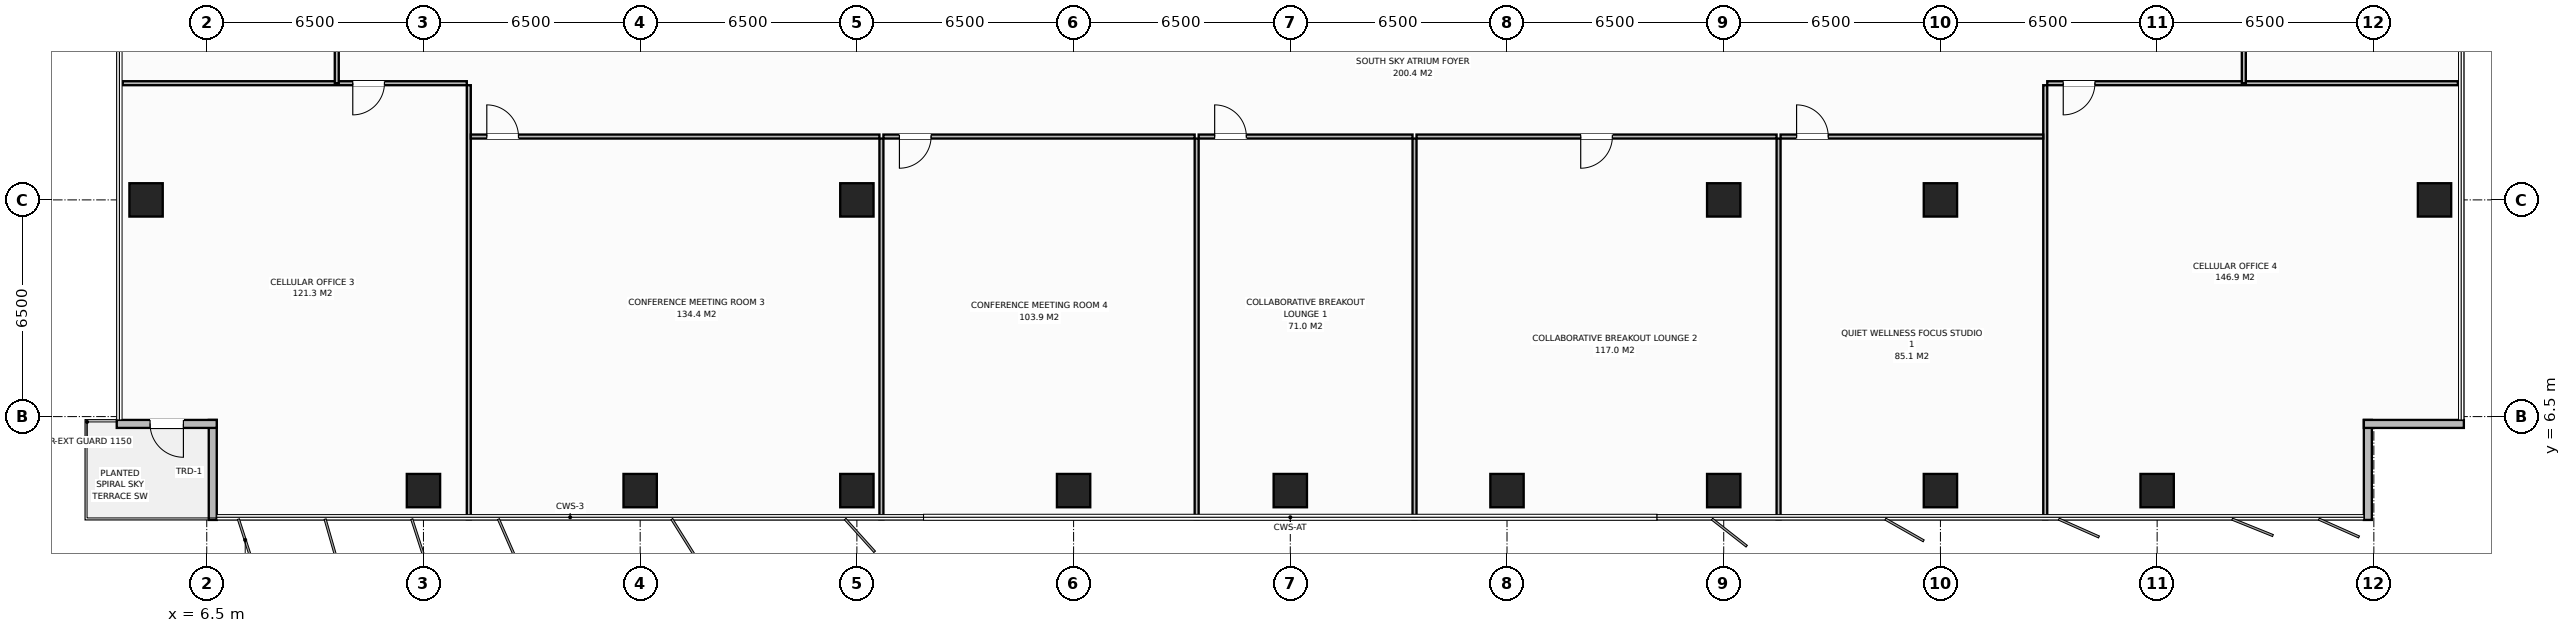
"""IFC4 building model, lengths in metres.
Left out: names, types, materials, properties, quantities, classifications, styles, units other than length and angle.
Written with IfcOpenShell. Run it as: python <this file> out.ifc"""

import sys

from ifc_helpers import new_model, si_unit, direction, frame, frame_2d, origin, origin_2d, place, context, subcontext, project, spatial, rectangle, extrude, element, fill, save


model = new_model("IFC4")
c1 = context("Model", 3, precision=1e-05, world=origin(), true_north=direction((0.0, 1.0)))
c2 = subcontext(c1, "Body", "Model", "MODEL_VIEW")
j1 = project(units=[si_unit("LENGTHUNIT", "METRE"), si_unit("PLANEANGLEUNIT", "RADIAN")], contexts=[c1])
p1 = place(None, origin())
s1 = spatial("IfcSite", under=j1, at=p1, CompositionType="ELEMENT")
p2 = place(p1, origin())
s2 = spatial("IfcBuilding", under=s1, at=p2, CompositionType="ELEMENT")
p3 = place(p2, frame((0.0, 0.0, 167.0)))
s3 = spatial("IfcBuildingStorey", under=s2, at=p3, CompositionType="ELEMENT", Elevation=167.0)
for number, where, z_axis, x_axis in (
    (1, (58.5, 13.0, 0.0), (0.0, 0.0, 1.0), (1.0, 0.0, 0.0)),
    (2, (26.0, 13.0, 0.0), (0.0, 0.0, 1.0), (1.0, 0.0, 0.0)),
    (3, (52.0, 13.0, 0.0), (0.0, 0.0, 1.0), (1.0, 0.0, 0.0)),
    (4, (13.0, 4.28, 0.0), (0.0, 0.0, 1.0), (1.0, 0.0, 0.0)),
    (5, (19.5, 4.28, 0.0), (0.0, 0.0, 1.0), (1.0, 0.0, 0.0)),
    (6, (26.0, 4.28, 0.0), (0.0, 0.0, 1.0), (1.0, 0.0, 0.0)),
    (7, (32.5, 4.28, 0.0), (0.0, 0.0, 1.0), (1.0, 0.0, 0.0)),
    (8, (39.0, 4.28, 0.0), (0.0, 0.0, 1.0), (1.0, 0.0, 0.0)),
    (9, (45.5, 4.28, 0.0), (0.0, 0.0, 1.0), (1.0, 0.0, 0.0)),
    (10, (52.0, 4.28, 0.0), (0.0, 0.0, 1.0), (1.0, 0.0, 0.0)),
    (11, (58.5, 4.28, 0.0), (0.0, 0.0, 1.0), (1.0, 0.0, 0.0)),
    (12, (65.0, 4.28, 0.0), (0.0, 0.0, 1.0), (1.0, 0.0, 0.0)),
    (13, (4.68, 13.0, 0.0), (0.0, 0.0, 1.0), (1.0, 0.0, 0.0)),
    (14, (73.32, 13.0, 0.0), (0.0, 0.0, 1.0), (1.0, 0.0, 0.0)),
):
    element("IfcColumn", number, at=place(p3, frame(where, z_axis=z_axis, x_axis=x_axis)), inside=s3, PredefinedType="COLUMN", context=c2, shape_type="SweptSolid", body=[
        extrude(rectangle(XDim=1.0, YDim=1.0, at=origin_2d()), origin(), (0.0, 0.0, 1.0), 3.8),
    ])
p4 = place(p3, frame((6.68, 3.4, 0.0), z_axis=(0.0, 0.0, 1.0), x_axis=(0.0, 1.0, 0.0)))
e15 = element("IfcWall", 15, at=p4, inside=s3, PredefinedType="STANDARD", context=c2, shape_type="SweptSolid", body=[
    extrude(rectangle(XDim=3.0, YDim=0.24, at=frame_2d((1.5, 0.0))), origin(), (0.0, 0.0, 1.0), 3.572),
])
p5 = place(p3, frame((6.8, 6.28, 0.0), z_axis=(0.0, 0.0, 1.0), x_axis=(-1.0, 0.0, 0.0)))
e16 = element("IfcWall", 16, at=p5, inside=s3, PredefinedType="STANDARD", context=c2, shape_type="SweptSolid", body=[
    extrude(rectangle(XDim=3.0, YDim=0.24, at=frame_2d((1.5, 0.0))), origin(), (0.0, 0.0, 1.0), 3.572),
])
p6 = place(p5, frame((1.0, 0.0, 0.0)))
e17 = element("IfcOpeningElement", 17, at=p6, cuts=e16, PredefinedType="OPENING", context=c2, shape_type="SweptSolid", body=[
    extrude(rectangle(XDim=1.0, YDim=2.2, at=frame_2d((0.5, 1.1))), frame((0.0, 0.13, 0.0), z_axis=(0.0, -1.0, 0.0), x_axis=(1.0, 0.0, 0.0)), (0.0, 0.0, 1.0), 0.26),
])
for number, where, z_axis, x_axis in (
    (18, (71.32, 6.4, 0.0), (0.0, 0.0, 1.0), (0.0, -1.0, 0.0)),
    (19, (74.2, 6.28, 0.0), (0.0, 0.0, 1.0), (-1.0, 0.0, 0.0)),
):
    element("IfcWall", number, at=place(p3, frame(where, z_axis=z_axis, x_axis=x_axis)), inside=s3, PredefinedType="STANDARD", context=c2, shape_type="SweptSolid", body=[
        extrude(rectangle(XDim=3.0, YDim=0.24, at=frame_2d((1.5, 0.0))), origin(), (0.0, 0.0, 1.0), 3.572),
    ])
p7 = place(p3, frame((14.36, 3.42, 0.0), z_axis=(0.0, 0.0, 1.0), x_axis=(0.0, 1.0, 0.0)))
e20 = element("IfcWall", 20, at=p7, inside=s3, PredefinedType="PARTITIONING", context=c2, shape_type="SweptSolid", body=[
    extrude(rectangle(XDim=13.02, YDim=0.12, at=frame_2d((6.51, 0.0))), origin(), (0.0, 0.0, 1.0), 3.572),
])
p8 = place(p3, frame((3.98, 16.5, 0.0), z_axis=(0.0, 0.0, 1.0), x_axis=(1.0, 0.0, 0.0)))
e21 = element("IfcWall", 21, at=p8, inside=s3, PredefinedType="PARTITIONING", context=c2, shape_type="SweptSolid", body=[
    extrude(rectangle(XDim=10.32, YDim=0.12, at=frame_2d((5.16, 0.0))), origin(), (0.0, 0.0, 1.0), 3.572),
])
p9 = place(p8, frame((6.9, 0.0, 0.0)))
e22 = element("IfcOpeningElement", 22, at=p9, cuts=e21, PredefinedType="OPENING", context=c2, shape_type="SweptSolid", body=[
    extrude(rectangle(XDim=0.95, YDim=2.15, at=frame_2d((0.475, 1.075))), frame((0.0, 0.07, 0.0), z_axis=(0.0, -1.0, 0.0), x_axis=(1.0, 0.0, 0.0)), (0.0, 0.0, 1.0), 0.14),
])
p10 = place(p3, frame((26.736, 3.42, 0.0), z_axis=(0.0, 0.0, 1.0), x_axis=(0.0, 1.0, 0.0)))
e23 = element("IfcWall", 23, at=p10, inside=s3, PredefinedType="PARTITIONING", context=c2, shape_type="SweptSolid", body=[
    extrude(rectangle(XDim=11.42, YDim=0.12, at=frame_2d((5.71, 0.0))), origin(), (0.0, 0.0, 1.0), 3.572),
])
p11 = place(p3, frame((14.42, 14.9, 0.0), z_axis=(0.0, 0.0, 1.0), x_axis=(1.0, 0.0, 0.0)))
e24 = element("IfcWall", 24, at=p11, inside=s3, PredefinedType="PARTITIONING", context=c2, shape_type="SweptSolid", body=[
    extrude(rectangle(XDim=12.256, YDim=0.12, at=frame_2d((6.128, 0.0))), origin(), (0.0, 0.0, 1.0), 3.572),
])
p12 = place(p11, frame((0.48, 0.0, 0.0)))
e25 = element("IfcOpeningElement", 25, at=p12, cuts=e24, PredefinedType="OPENING", context=c2, shape_type="SweptSolid", body=[
    extrude(rectangle(XDim=0.95, YDim=2.15, at=frame_2d((0.475, 1.075))), frame((0.0, 0.07, 0.0), z_axis=(0.0, -1.0, 0.0), x_axis=(1.0, 0.0, 0.0)), (0.0, 0.0, 1.0), 0.14),
])
p13 = place(p3, frame((36.191, 3.42, 0.0), z_axis=(0.0, 0.0, 1.0), x_axis=(0.0, 1.0, 0.0)))
e26 = element("IfcWall", 26, at=p13, inside=s3, PredefinedType="PARTITIONING", context=c2, shape_type="SweptSolid", body=[
    extrude(rectangle(XDim=11.42, YDim=0.12, at=frame_2d((5.71, 0.0))), origin(), (0.0, 0.0, 1.0), 3.572),
])
p14 = place(p3, frame((26.796, 14.9, 0.0), z_axis=(0.0, 0.0, 1.0), x_axis=(1.0, 0.0, 0.0)))
e27 = element("IfcWall", 27, at=p14, inside=s3, PredefinedType="PARTITIONING", context=c2, shape_type="SweptSolid", body=[
    extrude(rectangle(XDim=9.335, YDim=0.12, at=frame_2d((4.668, 0.0))), origin(), (0.0, 0.0, 1.0), 3.572),
])
p15 = place(p14, frame((0.48, 0.0, 0.0)))
e28 = element("IfcOpeningElement", 28, at=p15, cuts=e27, PredefinedType="OPENING", context=c2, shape_type="SweptSolid", body=[
    extrude(rectangle(XDim=0.95, YDim=2.15, at=frame_2d((0.475, 1.075))), frame((0.0, 0.07, 0.0), z_axis=(0.0, -1.0, 0.0), x_axis=(1.0, 0.0, 0.0)), (0.0, 0.0, 1.0), 0.14),
])
p16 = place(p3, frame((42.726, 3.42, 0.0), z_axis=(0.0, 0.0, 1.0), x_axis=(0.0, 1.0, 0.0)))
e29 = element("IfcWall", 29, at=p16, inside=s3, PredefinedType="PARTITIONING", context=c2, shape_type="SweptSolid", body=[
    extrude(rectangle(XDim=11.42, YDim=0.12, at=frame_2d((5.71, 0.0))), origin(), (0.0, 0.0, 1.0), 3.572),
])
p17 = place(p3, frame((36.251, 14.9, 0.0), z_axis=(0.0, 0.0, 1.0), x_axis=(1.0, 0.0, 0.0)))
e30 = element("IfcWall", 30, at=p17, inside=s3, PredefinedType="PARTITIONING", context=c2, shape_type="SweptSolid", body=[
    extrude(rectangle(XDim=6.415, YDim=0.12, at=frame_2d((3.207, 0.0))), origin(), (0.0, 0.0, 1.0), 3.572),
])
p18 = place(p17, frame((0.48, 0.0, 0.0)))
e31 = element("IfcOpeningElement", 31, at=p18, cuts=e30, PredefinedType="OPENING", context=c2, shape_type="SweptSolid", body=[
    extrude(rectangle(XDim=0.95, YDim=2.15, at=frame_2d((0.475, 1.075))), frame((0.0, 0.07, 0.0), z_axis=(0.0, -1.0, 0.0), x_axis=(1.0, 0.0, 0.0)), (0.0, 0.0, 1.0), 0.14),
])
p19 = place(p3, frame((53.646, 3.42, 0.0), z_axis=(0.0, 0.0, 1.0), x_axis=(0.0, 1.0, 0.0)))
e32 = element("IfcWall", 32, at=p19, inside=s3, PredefinedType="PARTITIONING", context=c2, shape_type="SweptSolid", body=[
    extrude(rectangle(XDim=11.42, YDim=0.12, at=frame_2d((5.71, 0.0))), origin(), (0.0, 0.0, 1.0), 3.572),
])
p20 = place(p3, frame((42.786, 14.9, 0.0), z_axis=(0.0, 0.0, 1.0), x_axis=(1.0, 0.0, 0.0)))
e33 = element("IfcWall", 33, at=p20, inside=s3, PredefinedType="PARTITIONING", context=c2, shape_type="SweptSolid", body=[
    extrude(rectangle(XDim=10.799, YDim=0.12, at=frame_2d((5.4, 0.0))), origin(), (0.0, 0.0, 1.0), 3.572),
])
p21 = place(p20, frame((4.925, 0.0, 0.0)))
e34 = element("IfcOpeningElement", 34, at=p21, cuts=e33, PredefinedType="OPENING", context=c2, shape_type="SweptSolid", body=[
    extrude(rectangle(XDim=0.95, YDim=2.15, at=frame_2d((0.475, 1.075))), frame((0.0, 0.07, 0.0), z_axis=(0.0, -1.0, 0.0), x_axis=(1.0, 0.0, 0.0)), (0.0, 0.0, 1.0), 0.14),
])
p22 = place(p3, frame((61.644, 3.42, 0.0), z_axis=(0.0, 0.0, 1.0), x_axis=(0.0, 1.0, 0.0)))
e35 = element("IfcWall", 35, at=p22, inside=s3, PredefinedType="PARTITIONING", context=c2, shape_type="SweptSolid", body=[
    extrude(rectangle(XDim=13.02, YDim=0.12, at=frame_2d((6.51, 0.0))), origin(), (0.0, 0.0, 1.0), 3.572),
])
p23 = place(p3, frame((53.705, 14.9, 0.0), z_axis=(0.0, 0.0, 1.0), x_axis=(1.0, 0.0, 0.0)))
e36 = element("IfcWall", 36, at=p23, inside=s3, PredefinedType="PARTITIONING", context=c2, shape_type="SweptSolid", body=[
    extrude(rectangle(XDim=7.879, YDim=0.12, at=frame_2d((3.939, 0.0))), origin(), (0.0, 0.0, 1.0), 3.572),
])
p24 = place(p23, frame((0.48, 0.0, 0.0)))
e37 = element("IfcOpeningElement", 37, at=p24, cuts=e36, PredefinedType="OPENING", context=c2, shape_type="SweptSolid", body=[
    extrude(rectangle(XDim=0.95, YDim=2.15, at=frame_2d((0.475, 1.075))), frame((0.0, 0.07, 0.0), z_axis=(0.0, -1.0, 0.0), x_axis=(1.0, 0.0, 0.0)), (0.0, 0.0, 1.0), 0.14),
])
p25 = place(p3, frame((61.704, 16.5, 0.0), z_axis=(0.0, 0.0, 1.0), x_axis=(1.0, 0.0, 0.0)))
e38 = element("IfcWall", 38, at=p25, inside=s3, PredefinedType="PARTITIONING", context=c2, shape_type="SweptSolid", body=[
    extrude(rectangle(XDim=12.316, YDim=0.12, at=frame_2d((6.158, 0.0))), origin(), (0.0, 0.0, 1.0), 3.572),
])
p26 = place(p25, frame((0.48, 0.0, 0.0)))
e39 = element("IfcOpeningElement", 39, at=p26, cuts=e38, PredefinedType="OPENING", context=c2, shape_type="SweptSolid", body=[
    extrude(rectangle(XDim=0.95, YDim=2.15, at=frame_2d((0.475, 1.075))), frame((0.0, 0.07, 0.0), z_axis=(0.0, -1.0, 0.0), x_axis=(1.0, 0.0, 0.0)), (0.0, 0.0, 1.0), 0.14),
])
p27 = place(p3, frame((10.4, 16.5, 0.0), z_axis=(0.0, 0.0, 1.0), x_axis=(0.0, 1.0, 0.0)))
e40 = element("IfcWall", 40, at=p27, inside=s3, PredefinedType="PARTITIONING", context=c2, shape_type="SweptSolid", body=[
    extrude(rectangle(XDim=19.0, YDim=0.12, at=frame_2d((9.5, 0.0))), origin(), (0.0, 0.0, 1.0), 3.572),
])
p28 = place(p27, frame((9.025, 0.0, 0.0)))
e41 = element("IfcOpeningElement", 41, at=p28, cuts=e40, PredefinedType="OPENING", context=c2, shape_type="SweptSolid", body=[
    extrude(rectangle(XDim=0.95, YDim=2.15, at=frame_2d((0.475, 1.075))), frame((0.0, 0.07, 0.0), z_axis=(0.0, -1.0, 0.0), x_axis=(1.0, 0.0, 0.0)), (0.0, 0.0, 1.0), 0.14),
])
p29 = place(p3, frame((67.6, 16.5, 0.0), z_axis=(0.0, 0.0, 1.0), x_axis=(0.0, 1.0, 0.0)))
e42 = element("IfcWall", 42, at=p29, inside=s3, PredefinedType="PARTITIONING", context=c2, shape_type="SweptSolid", body=[
    extrude(rectangle(XDim=9.5, YDim=0.12, at=frame_2d((4.75, 0.0))), origin(), (0.0, 0.0, 1.0), 3.572),
])
p30 = place(p29, frame((5.325, 0.0, 0.0)))
e43 = element("IfcOpeningElement", 43, at=p30, cuts=e42, PredefinedType="OPENING", context=c2, shape_type="SweptSolid", body=[
    extrude(rectangle(XDim=0.95, YDim=2.15, at=frame_2d((0.475, 1.075))), frame((0.0, 0.07, 0.0), z_axis=(0.0, -1.0, 0.0), x_axis=(1.0, 0.0, 0.0)), (0.0, 0.0, 1.0), 0.14),
])
p31 = place(p6, origin())
e44 = element("IfcDoor", 44, at=p31, inside=s3, OperationType="SINGLE_SWING_LEFT", PredefinedType="DOOR", context=c2, shape_type="SweptSolid", body=[
    extrude(rectangle(XDim=1.0, YDim=2.2, at=frame_2d((0.5, 1.1))), frame((0.0, 0.025, 0.0), z_axis=(0.0, -1.0, 0.0), x_axis=(1.0, 0.0, 0.0)), (0.0, 0.0, 1.0), 0.05),
])
fill(e17, e44)
p32 = place(p9, origin())
e45 = element("IfcDoor", 45, at=p32, inside=s3, OperationType="SINGLE_SWING_RIGHT", PredefinedType="DOOR", context=c2, shape_type="SweptSolid", body=[
    extrude(rectangle(XDim=0.95, YDim=2.15, at=frame_2d((0.475, 1.075))), frame((0.0, 0.025, 0.0), z_axis=(0.0, -1.0, 0.0), x_axis=(1.0, 0.0, 0.0)), (0.0, 0.0, 1.0), 0.05),
])
fill(e22, e45)
p33 = place(p12, origin())
e46 = element("IfcDoor", 46, at=p33, inside=s3, OperationType="SINGLE_SWING_LEFT", PredefinedType="DOOR", context=c2, shape_type="SweptSolid", body=[
    extrude(rectangle(XDim=0.95, YDim=2.15, at=frame_2d((0.475, 1.075))), frame((0.0, 0.025, 0.0), z_axis=(0.0, -1.0, 0.0), x_axis=(1.0, 0.0, 0.0)), (0.0, 0.0, 1.0), 0.05),
])
fill(e25, e46)
p34 = place(p15, origin())
e47 = element("IfcDoor", 47, at=p34, inside=s3, OperationType="SINGLE_SWING_RIGHT", PredefinedType="DOOR", context=c2, shape_type="SweptSolid", body=[
    extrude(rectangle(XDim=0.95, YDim=2.15, at=frame_2d((0.475, 1.075))), frame((0.0, 0.025, 0.0), z_axis=(0.0, -1.0, 0.0), x_axis=(1.0, 0.0, 0.0)), (0.0, 0.0, 1.0), 0.05),
])
fill(e28, e47)
p35 = place(p18, origin())
e48 = element("IfcDoor", 48, at=p35, inside=s3, OperationType="SINGLE_SWING_LEFT", PredefinedType="DOOR", context=c2, shape_type="SweptSolid", body=[
    extrude(rectangle(XDim=0.95, YDim=2.15, at=frame_2d((0.475, 1.075))), frame((0.0, 0.025, 0.0), z_axis=(0.0, -1.0, 0.0), x_axis=(1.0, 0.0, 0.0)), (0.0, 0.0, 1.0), 0.05),
])
fill(e31, e48)
p36 = place(p21, origin())
e49 = element("IfcDoor", 49, at=p36, inside=s3, OperationType="SINGLE_SWING_RIGHT", PredefinedType="DOOR", context=c2, shape_type="SweptSolid", body=[
    extrude(rectangle(XDim=0.95, YDim=2.15, at=frame_2d((0.475, 1.075))), frame((0.0, 0.025, 0.0), z_axis=(0.0, -1.0, 0.0), x_axis=(1.0, 0.0, 0.0)), (0.0, 0.0, 1.0), 0.05),
])
fill(e34, e49)
p37 = place(p24, origin())
e50 = element("IfcDoor", 50, at=p37, inside=s3, OperationType="SINGLE_SWING_LEFT", PredefinedType="DOOR", context=c2, shape_type="SweptSolid", body=[
    extrude(rectangle(XDim=0.95, YDim=2.15, at=frame_2d((0.475, 1.075))), frame((0.0, 0.025, 0.0), z_axis=(0.0, -1.0, 0.0), x_axis=(1.0, 0.0, 0.0)), (0.0, 0.0, 1.0), 0.05),
])
fill(e37, e50)
p38 = place(p26, origin())
e51 = element("IfcDoor", 51, at=p38, inside=s3, OperationType="SINGLE_SWING_RIGHT", PredefinedType="DOOR", context=c2, shape_type="SweptSolid", body=[
    extrude(rectangle(XDim=0.95, YDim=2.15, at=frame_2d((0.475, 1.075))), frame((0.0, 0.025, 0.0), z_axis=(0.0, -1.0, 0.0), x_axis=(1.0, 0.0, 0.0)), (0.0, 0.0, 1.0), 0.05),
])
fill(e39, e51)
save(model, sys.argv[1])
